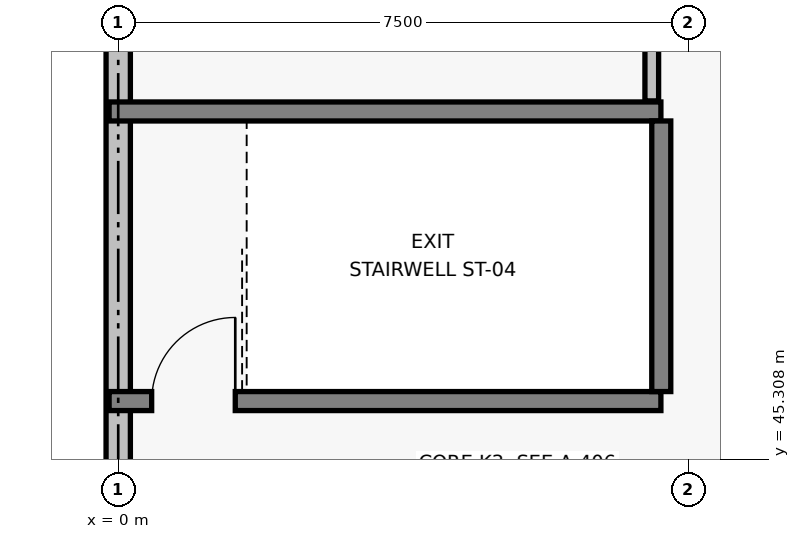
"""IFC4 building model, lengths in metres.
Left out: names, types, materials, properties, quantities, classifications, styles, units other than length and angle.
Written with IfcOpenShell. Run it as: python <this file> out.ifc"""

import sys

from ifc_helpers import new_model, si_unit, direction, frame, frame_2d, origin, place, context, subcontext, project, spatial, rectangle, extrude, element, fill, save


model = new_model("IFC4")
c1 = context("Model", 3, precision=1e-05, world=origin(), true_north=direction((0.0, 1.0)))
c2 = subcontext(c1, "Body", "Model", "MODEL_VIEW")
j1 = project(units=[si_unit("LENGTHUNIT", "METRE"), si_unit("PLANEANGLEUNIT", "RADIAN")], contexts=[c1])
p1 = place(None, origin())
s1 = spatial("IfcSite", under=j1, at=p1, CompositionType="ELEMENT")
p2 = place(p1, origin())
s2 = spatial("IfcBuilding", under=s1, at=p2, CompositionType="ELEMENT")
p3 = place(p2, frame((0.0, 0.0, 17.1)))
s3 = spatial("IfcBuildingStorey", under=s2, at=p3, CompositionType="ELEMENT", Elevation=17.1)
p4 = place(p3, frame((0.0, 45.265, 0.0), z_axis=(0.0, 0.0, 1.0), x_axis=(0.0, 1.0, 0.0)))
e1 = element("IfcWall", 1, at=p4, inside=s3, PredefinedType="SOLIDWALL", context=c2, shape_type="SweptSolid", body=[
    extrude(rectangle(XDim=6.97, YDim=0.32, at=frame_2d((3.485, 0.0))), origin(), (0.0, 0.0, 1.0), 2.59),
])
p5 = place(p3, frame((-0.12, 46.075, 0.0), z_axis=(0.0, 0.0, 1.0), x_axis=(1.0, 0.0, 0.0)))
e2 = element("IfcWall", 2, at=p5, inside=s3, PredefinedType="SOLIDWALL", context=c2, shape_type="SweptSolid", body=[
    extrude(rectangle(XDim=7.26, YDim=0.25, at=frame_2d((3.63, 0.0))), origin(), (0.0, 0.0, 1.0), 3.62),
])
p6 = place(p5, frame((0.56, 0.0, 0.0)))
e3 = element("IfcOpeningElement", 3, at=p6, cuts=e2, PredefinedType="OPENING", context=c2, shape_type="SweptSolid", body=[
    extrude(rectangle(XDim=1.1, YDim=2.15, at=frame_2d((0.55, 1.075))), frame((0.0, 0.135, 0.0), z_axis=(0.0, -1.0, 0.0), x_axis=(1.0, 0.0, 0.0)), (0.0, 0.0, 1.0), 0.27),
])
p7 = place(p3, frame((-0.12, 49.885, 0.0), z_axis=(0.0, 0.0, 1.0), x_axis=(1.0, 0.0, 0.0)))
e4 = element("IfcWall", 4, at=p7, inside=s3, PredefinedType="SOLIDWALL", context=c2, shape_type="SweptSolid", body=[
    extrude(rectangle(XDim=7.26, YDim=0.25, at=frame_2d((3.63, 0.0))), origin(), (0.0, 0.0, 1.0), 3.62),
])
p8 = place(p3, frame((7.145, 46.2, 0.0), z_axis=(0.0, 0.0, 1.0), x_axis=(0.0, 1.0, 0.0)))
e5 = element("IfcWall", 5, at=p8, inside=s3, PredefinedType="SOLIDWALL", context=c2, shape_type="SweptSolid", body=[
    extrude(rectangle(XDim=3.56, YDim=0.25, at=frame_2d((1.78, 0.0))), origin(), (0.0, 0.0, 1.0), 3.62),
])
p9 = place(p3, frame((7.02, 50.024, 0.0), z_axis=(0.0, 0.0, 1.0), x_axis=(0.0, 1.0, 0.0)))
e6 = element("IfcWall", 6, at=p9, inside=s3, PredefinedType="PARTITIONING", context=c2, shape_type="SweptSolid", body=[
    extrude(rectangle(XDim=2.384, YDim=0.18, at=frame_2d((1.192, 0.0))), origin(), (0.0, 0.0, 1.0), 2.59),
])
p10 = place(p6, origin())
e7 = element("IfcDoor", 7, at=p10, inside=s3, OperationType="SINGLE_SWING_RIGHT", PredefinedType="DOOR", context=c2, shape_type="SweptSolid", body=[
    extrude(rectangle(XDim=1.1, YDim=2.15, at=frame_2d((0.55, 1.075))), frame((0.0, 0.025, 0.0), z_axis=(0.0, -1.0, 0.0), x_axis=(1.0, 0.0, 0.0)), (0.0, 0.0, 1.0), 0.05),
])
fill(e3, e7)
save(model, sys.argv[1])
